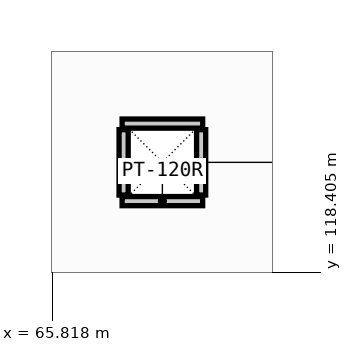
"""IFC4 building model, lengths in metres.
Left out: names, types, materials, properties, quantities, classifications, styles, units other than length and angle.
Written with IfcOpenShell. Run it as: python <this file> out.ifc"""

import sys

from ifc_helpers import new_model, si_unit, direction, frame, frame_2d, origin, place, context, subcontext, project, spatial, rectangle, extrude, element, save


model = new_model("IFC4")
c1 = context("Model", 3, precision=1e-05, world=origin(), true_north=direction((0.0, 1.0)))
c2 = subcontext(c1, "Body", "Model", "MODEL_VIEW")
j1 = project(units=[si_unit("LENGTHUNIT", "METRE"), si_unit("PLANEANGLEUNIT", "RADIAN")], contexts=[c1])
p1 = place(None, origin())
s1 = spatial("IfcSite", under=j1, at=p1, CompositionType="ELEMENT")
p2 = place(p1, origin())
s2 = spatial("IfcBuilding", under=s1, at=p2, CompositionType="ELEMENT")
p3 = place(p2, frame((0.0, 0.0, 4.8)))
s3 = spatial("IfcBuildingStorey", under=s2, at=p3, CompositionType="ELEMENT", Elevation=4.8)
for number, where, z_axis, x_axis in (
    (1, (66.74, 119.34, 0.0), (0.0, 0.0, 1.0), (1.0, 0.0, 0.0)),
    (2, (66.74, 120.36, 0.0), (0.0, 0.0, 1.0), (1.0, 0.0, 0.0)),
):
    element("IfcWall", number, at=place(p3, frame(where, z_axis=z_axis, x_axis=x_axis)), inside=s3, PredefinedType="PARTITIONING", context=c2, shape_type="SweptSolid", body=[
        extrude(rectangle(XDim=1.06, YDim=0.12, at=frame_2d((0.53, 0.0))), origin(), (0.0, 0.0, 1.0), 2.95),
    ])
for number, where, z_axis, x_axis in (
    (3, (66.76, 119.42, 0.0), (0.0, 0.0, 1.0), (0.0, 1.0, 0.0)),
    (4, (67.78, 119.42, 0.0), (0.0, 0.0, 1.0), (0.0, 1.0, 0.0)),
):
    element("IfcWall", number, at=place(p3, frame(where, z_axis=z_axis, x_axis=x_axis)), inside=s3, PredefinedType="PARTITIONING", context=c2, shape_type="SweptSolid", body=[
        extrude(rectangle(XDim=0.86, YDim=0.12, at=frame_2d((0.43, 0.0))), origin(), (0.0, 0.0, 1.0), 2.95),
    ])
save(model, sys.argv[1])
